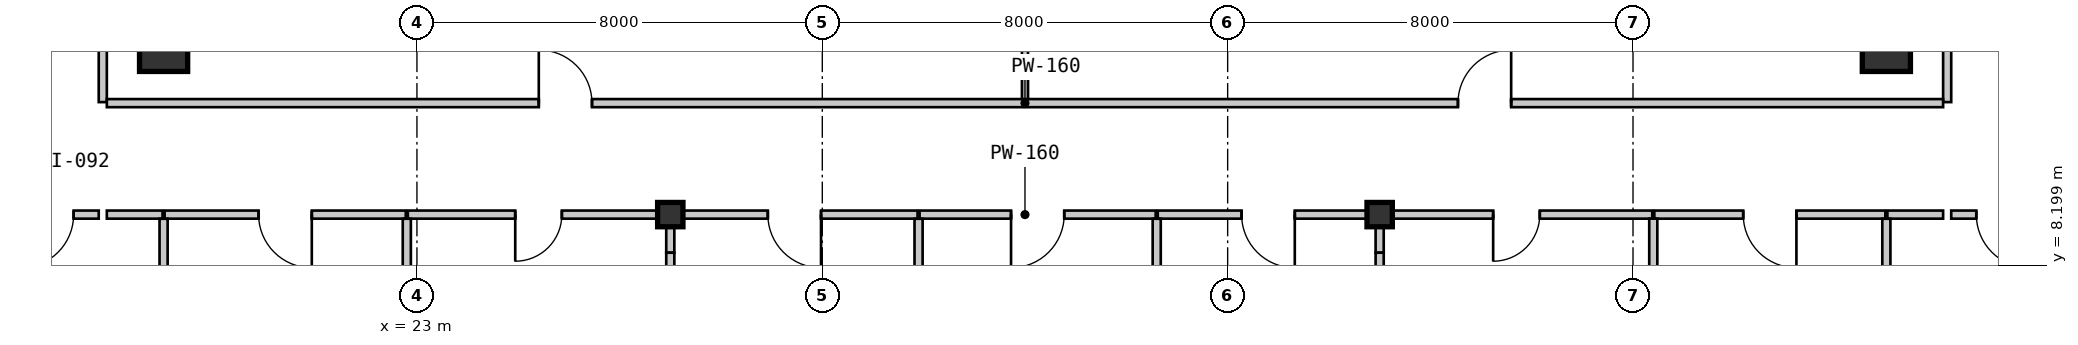
"""IFC4 building model, lengths in metres.
Left out: names, types, materials, properties, quantities, classifications, styles, units other than length and angle.
Written with IfcOpenShell. Run it as: python <this file> out.ifc"""

import sys

from ifc_helpers import new_model, si_unit, direction, frame, frame_2d, origin, origin_2d, place, context, subcontext, project, spatial, rectangle, i_section, extrude, source, transform, mapped, element, fill, save


model = new_model("IFC4")
c1 = context("Model", 3, precision=1e-05, world=origin(), true_north=direction((0.0, 1.0)))
c2 = subcontext(c1, "Body", "Model", "MODEL_VIEW")
j1 = project(units=[si_unit("LENGTHUNIT", "METRE"), si_unit("PLANEANGLEUNIT", "RADIAN")], contexts=[c1])
p1 = place(None, origin())
s1 = spatial("IfcSite", under=j1, at=p1, CompositionType="ELEMENT")
p2 = place(p1, origin())
s2 = spatial("IfcBuilding", under=s1, at=p2, CompositionType="ELEMENT")
p3 = place(p2, frame((0.0, 0.0, 19.95)))
s3 = spatial("IfcBuildingStorey", under=s2, at=p3, CompositionType="ELEMENT", Elevation=19.95)
m1 = source(origin(), c2, "Body", "SweptSolid", [
    extrude(i_section(OverallWidth=0.5, OverallDepth=0.48, WebThickness=0.028, FlangeThickness=0.044, at=origin_2d()), origin(), (0.0, 0.0, 1.0), 3.15),
])
for number, where, z_axis, x_axis in (
    (1, (28.0, 9.2, 0.0), (0.0, 0.0, 1.0), (1.0, 0.0, 0.0)),
    (2, (42.0, 9.2, 0.0), (0.0, 0.0, 1.0), (1.0, 0.0, 0.0)),
):
    element("IfcColumn", number, at=place(p3, frame(where, z_axis=z_axis, x_axis=x_axis)), inside=s3, PredefinedType="COLUMN", context=c2, shape_type="MappedRepresentation", body=[
        mapped(m1, transform((0.0, 0.0, 0.0), scale=1.0)),
    ])
m2 = source(origin(), c2, "Body", "SweptSolid", [
    extrude(rectangle(XDim=0.95, YDim=0.95, at=origin_2d()), origin(), (0.0, 0.0, 1.0), 3.15),
])
for number, where, z_axis, x_axis in (
    (3, (18.0, 12.5, 0.0), (0.0, 0.0, 1.0), (1.0, 0.0, 0.0)),
    (4, (52.0, 12.5, 0.0), (0.0, 0.0, 1.0), (1.0, 0.0, 0.0)),
):
    element("IfcColumn", number, at=place(p3, frame(where, z_axis=z_axis, x_axis=x_axis)), inside=s3, PredefinedType="COLUMN", context=c2, shape_type="MappedRepresentation", body=[
        mapped(m2, transform((0.0, 0.0, 0.0), scale=1.0)),
    ])
m3 = source(origin(), c2, "Body", "SweptSolid", [
    extrude(rectangle(XDim=5.16, YDim=0.16, at=frame_2d((2.58, 0.0))), origin(), (0.0, 0.0, 1.0), 2.93),
])
for number, where, z_axis, x_axis in (
    (5, (16.8, 16.58, 0.0), (0.0, 0.0, 1.0), (0.0, -1.0, 0.0)),
    (6, (53.2, 11.42, 0.0), (0.0, 0.0, 1.0), (0.0, 1.0, 0.0)),
):
    element("IfcWall", number, at=place(p3, frame(where, z_axis=z_axis, x_axis=x_axis)), inside=s3, PredefinedType="PARTITIONING", context=c2, shape_type="MappedRepresentation", body=[
        mapped(m3, transform((0.0, 0.0, 0.0), scale=1.0)),
    ])
m4 = source(origin(), c2, "Body", "SweptSolid", [
    extrude(rectangle(XDim=2.04, YDim=0.16, at=frame_2d((1.02, 0.0))), origin(), (0.0, 0.0, 1.0), 2.93),
])
p4 = place(p3, frame((16.72, 9.2, 0.0), z_axis=(0.0, 0.0, 1.0), x_axis=(-1.0, 0.0, 0.0)))
e7 = element("IfcWall", 7, at=p4, inside=s3, PredefinedType="PARTITIONING", context=c2, shape_type="MappedRepresentation", body=[
    mapped(m4, transform((0.0, 0.0, 0.0), scale=1.0)),
])
m5 = source(origin(), c2, "Body", "SweptSolid", [
    extrude(rectangle(XDim=1.05, YDim=2.1, at=frame_2d((0.525, 1.05))), frame((0.0, 0.09, 0.0), z_axis=(0.0, -1.0, 0.0), x_axis=(1.0, 0.0, 0.0)), (0.0, 0.0, 1.0), 0.18),
])
p5 = place(p4, frame((0.495, 0.0, 0.0)))
e8 = element("IfcOpeningElement", 8, at=p5, cuts=e7, PredefinedType="OPENING", context=c2, shape_type="MappedRepresentation", body=[
    mapped(m5, transform((0.0, 0.0, 0.0), scale=1.0)),
])
p6 = place(p3, frame((55.32, 9.2, 0.0), z_axis=(0.0, 0.0, 1.0), x_axis=(-1.0, 0.0, 0.0)))
e9 = element("IfcWall", 9, at=p6, inside=s3, PredefinedType="PARTITIONING", context=c2, shape_type="MappedRepresentation", body=[
    mapped(m4, transform((0.0, 0.0, 0.0), scale=1.0)),
])
p7 = place(p6, frame((0.495, 0.0, 0.0)))
e10 = element("IfcOpeningElement", 10, at=p7, cuts=e9, PredefinedType="OPENING", context=c2, shape_type="MappedRepresentation", body=[
    mapped(m5, transform((0.0, 0.0, 0.0), scale=1.0)),
])
m6 = source(origin(), c2, "Body", "SweptSolid", [
    extrude(rectangle(XDim=18.1, YDim=0.16, at=frame_2d((9.05, 0.0))), origin(), (0.0, 0.0, 1.0), 2.93),
])
p8 = place(p3, frame((16.88, 11.4, 0.0), z_axis=(0.0, 0.0, 1.0), x_axis=(1.0, 0.0, 0.0)))
e11 = element("IfcWall", 11, at=p8, inside=s3, PredefinedType="PARTITIONING", context=c2, shape_type="MappedRepresentation", body=[
    mapped(m6, transform((0.0, 0.0, 0.0), scale=1.0)),
])
p9 = place(p8, frame((8.525, 0.0, 0.0)))
e12 = element("IfcOpeningElement", 12, at=p9, cuts=e11, PredefinedType="OPENING", context=c2, shape_type="MappedRepresentation", body=[
    mapped(m5, transform((0.0, 0.0, 0.0), scale=1.0)),
])
p10 = place(p3, frame((35.02, 11.4, 0.0), z_axis=(0.0, 0.0, 1.0), x_axis=(1.0, 0.0, 0.0)))
e13 = element("IfcWall", 13, at=p10, inside=s3, PredefinedType="PARTITIONING", context=c2, shape_type="MappedRepresentation", body=[
    mapped(m6, transform((0.0, 0.0, 0.0), scale=1.0)),
])
p11 = place(p10, frame((8.525, 0.0, 0.0)))
e14 = element("IfcOpeningElement", 14, at=p11, cuts=e13, PredefinedType="OPENING", context=c2, shape_type="MappedRepresentation", body=[
    mapped(m5, transform((0.0, 0.0, 0.0), scale=1.0)),
])
m7 = source(origin(), c2, "Body", "SweptSolid", [
    extrude(rectangle(XDim=1.1, YDim=0.16, at=frame_2d((0.55, 0.0))), origin(), (0.0, 0.0, 1.0), 2.93),
])
p12 = place(p3, frame((17.98, 9.2, 0.0), z_axis=(0.0, 0.0, 1.0), x_axis=(-1.0, 0.0, 0.0)))
e15 = element("IfcWall", 15, at=p12, inside=s3, PredefinedType="PARTITIONING", context=c2, shape_type="MappedRepresentation", body=[
    mapped(m7, transform((0.0, 0.0, 0.0), scale=1.0)),
])
m8 = source(origin(), c2, "Body", "SweptSolid", [
    extrude(rectangle(XDim=4.76, YDim=0.16, at=frame_2d((2.38, 0.0))), origin(), (0.0, 0.0, 1.0), 2.93),
])
p13 = place(p3, frame((22.78, 9.2, 0.0), z_axis=(0.0, 0.0, 1.0), x_axis=(-1.0, 0.0, 0.0)))
e16 = element("IfcWall", 16, at=p13, inside=s3, PredefinedType="PARTITIONING", context=c2, shape_type="MappedRepresentation", body=[
    mapped(m8, transform((0.0, 0.0, 0.0), scale=1.0)),
])
p14 = place(p13, frame((1.855, 0.0, 0.0)))
e17 = element("IfcOpeningElement", 17, at=p14, cuts=e16, PredefinedType="OPENING", context=c2, shape_type="MappedRepresentation", body=[
    mapped(m5, transform((0.0, 0.0, 0.0), scale=1.0)),
])
m9 = source(origin(), c2, "Body", "SweptSolid", [
    extrude(rectangle(XDim=5.159, YDim=0.16, at=frame_2d((2.58, 0.0))), origin(), (0.0, 0.0, 1.0), 2.93),
])
p15 = place(p3, frame((27.98, 9.2, 0.0), z_axis=(0.0, 0.0, 1.0), x_axis=(-1.0, 0.0, 0.0)))
e18 = element("IfcWall", 18, at=p15, inside=s3, PredefinedType="PARTITIONING", context=c2, shape_type="MappedRepresentation", body=[
    mapped(m9, transform((0.0, 0.0, 0.0), scale=1.0)),
])
m10 = source(origin(), c2, "Body", "SweptSolid", [
    extrude(rectangle(XDim=0.92, YDim=2.1, at=frame_2d((0.46, 1.05))), frame((0.0, 0.09, 0.0), z_axis=(0.0, -1.0, 0.0), x_axis=(1.0, 0.0, 0.0)), (0.0, 0.0, 1.0), 0.18),
])
p16 = place(p15, frame((2.12, 0.0, 0.0)))
e19 = element("IfcOpeningElement", 19, at=p16, cuts=e18, PredefinedType="OPENING", context=c2, shape_type="MappedRepresentation", body=[
    mapped(m10, transform((0.0, 0.0, 0.0), scale=1.0)),
])
m11 = source(origin(), c2, "Body", "SweptSolid", [
    extrude(rectangle(XDim=4.859, YDim=0.16, at=frame_2d((2.43, 0.0))), origin(), (0.0, 0.0, 1.0), 2.328),
])
p17 = place(p3, frame((32.88, 9.2, 0.0), z_axis=(0.0, 0.0, 1.0), x_axis=(-1.0, 0.0, 0.0)))
e20 = element("IfcWall", 20, at=p17, inside=s3, PredefinedType="PARTITIONING", context=c2, shape_type="MappedRepresentation", body=[
    mapped(m11, transform((0.0, 0.0, 0.0), scale=1.0)),
])
p18 = place(p17, frame((1.905, 0.0, 0.0)))
e21 = element("IfcOpeningElement", 21, at=p18, cuts=e20, PredefinedType="OPENING", context=c2, shape_type="MappedRepresentation", body=[
    mapped(m5, transform((0.0, 0.0, 0.0), scale=1.0)),
])
m12 = source(origin(), c2, "Body", "SweptSolid", [
    extrude(rectangle(XDim=4.659, YDim=0.16, at=frame_2d((2.33, 0.0))), origin(), (0.0, 0.0, 1.0), 2.328),
])
p19 = place(p3, frame((37.58, 9.2, 0.0), z_axis=(0.0, 0.0, 1.0), x_axis=(-1.0, 0.0, 0.0)))
e22 = element("IfcWall", 22, at=p19, inside=s3, PredefinedType="PARTITIONING", context=c2, shape_type="MappedRepresentation", body=[
    mapped(m12, transform((0.0, 0.0, 0.0), scale=1.0)),
])
p20 = place(p19, frame((1.805, 0.0, 0.0)))
e23 = element("IfcOpeningElement", 23, at=p20, cuts=e22, PredefinedType="OPENING", context=c2, shape_type="MappedRepresentation", body=[
    mapped(m5, transform((0.0, 0.0, 0.0), scale=1.0)),
])
m13 = source(origin(), c2, "Body", "SweptSolid", [
    extrude(rectangle(XDim=4.359, YDim=0.16, at=frame_2d((2.18, 0.0))), origin(), (0.0, 0.0, 1.0), 2.328),
])
p21 = place(p3, frame((41.98, 9.2, 0.0), z_axis=(0.0, 0.0, 1.0), x_axis=(-1.0, 0.0, 0.0)))
e24 = element("IfcWall", 24, at=p21, inside=s3, PredefinedType="PARTITIONING", context=c2, shape_type="MappedRepresentation", body=[
    mapped(m13, transform((0.0, 0.0, 0.0), scale=1.0)),
])
p22 = place(p21, frame((1.655, 0.0, 0.0)))
e25 = element("IfcOpeningElement", 25, at=p22, cuts=e24, PredefinedType="OPENING", context=c2, shape_type="MappedRepresentation", body=[
    mapped(m5, transform((0.0, 0.0, 0.0), scale=1.0)),
])
m14 = source(origin(), c2, "Body", "SweptSolid", [
    extrude(rectangle(XDim=5.36, YDim=0.16, at=frame_2d((2.68, 0.0))), origin(), (0.0, 0.0, 1.0), 2.93),
])
p23 = place(p3, frame((47.38, 9.2, 0.0), z_axis=(0.0, 0.0, 1.0), x_axis=(-1.0, 0.0, 0.0)))
e26 = element("IfcWall", 26, at=p23, inside=s3, PredefinedType="PARTITIONING", context=c2, shape_type="MappedRepresentation", body=[
    mapped(m14, transform((0.0, 0.0, 0.0), scale=1.0)),
])
p24 = place(p23, frame((2.22, 0.0, 0.0)))
e27 = element("IfcOpeningElement", 27, at=p24, cuts=e26, PredefinedType="OPENING", context=c2, shape_type="MappedRepresentation", body=[
    mapped(m10, transform((0.0, 0.0, 0.0), scale=1.0)),
])
m15 = source(origin(), c2, "Body", "SweptSolid", [
    extrude(rectangle(XDim=4.559, YDim=0.16, at=frame_2d((2.28, 0.0))), origin(), (0.0, 0.0, 1.0), 2.93),
])
p25 = place(p3, frame((51.98, 9.2, 0.0), z_axis=(0.0, 0.0, 1.0), x_axis=(-1.0, 0.0, 0.0)))
e28 = element("IfcWall", 28, at=p25, inside=s3, PredefinedType="PARTITIONING", context=c2, shape_type="MappedRepresentation", body=[
    mapped(m15, transform((0.0, 0.0, 0.0), scale=1.0)),
])
p26 = place(p25, frame((1.755, 0.0, 0.0)))
e29 = element("IfcOpeningElement", 29, at=p26, cuts=e28, PredefinedType="OPENING", context=c2, shape_type="MappedRepresentation", body=[
    mapped(m5, transform((0.0, 0.0, 0.0), scale=1.0)),
])
p27 = place(p3, frame((53.12, 9.2, 0.0), z_axis=(0.0, 0.0, 1.0), x_axis=(-1.0, 0.0, 0.0)))
e30 = element("IfcWall", 30, at=p27, inside=s3, PredefinedType="PARTITIONING", context=c2, shape_type="MappedRepresentation", body=[
    mapped(m7, transform((0.0, 0.0, 0.0), scale=1.0)),
])
m16 = source(origin(), c2, "Body", "SweptSolid", [
    extrude(rectangle(XDim=5.04, YDim=0.12, at=frame_2d((2.52, 0.0))), origin(), (0.0, 0.0, 1.0), 2.93),
])
p28 = place(p3, frame((35.0, 16.52, 0.0), z_axis=(0.0, 0.0, 1.0), x_axis=(0.0, -1.0, 0.0)))
e31 = element("IfcWall", 31, at=p28, inside=s3, PredefinedType="PARTITIONING", context=c2, shape_type="MappedRepresentation", body=[
    mapped(m16, transform((0.0, 0.0, 0.0), scale=1.0)),
])
m17 = source(origin(), c2, "Body", "SweptSolid", [
    extrude(rectangle(XDim=2.448, YDim=0.16, at=frame_2d((1.224, 0.0))), origin(), (0.0, 0.0, 1.0), 2.93),
])
p29 = place(p3, frame((18.0, 9.118, 0.0), z_axis=(0.0, 0.0, 1.0), x_axis=(0.0, -1.0, 0.0)))
e32 = element("IfcWall", 32, at=p29, inside=s3, PredefinedType="PARTITIONING", context=c2, shape_type="MappedRepresentation", body=[
    mapped(m17, transform((0.0, 0.0, 0.0), scale=1.0)),
])
m18 = source(origin(), c2, "Body", "SweptSolid", [
    extrude(rectangle(XDim=7.386, YDim=0.16, at=frame_2d((3.693, 0.0))), origin(), (0.0, 0.0, 1.0), 2.93),
])
p30 = place(p3, frame((22.8, 9.118, 0.0), z_axis=(0.0, 0.0, 1.0), x_axis=(0.0, -1.0, 0.0)))
e33 = element("IfcWall", 33, at=p30, inside=s3, PredefinedType="PARTITIONING", context=c2, shape_type="MappedRepresentation", body=[
    mapped(m18, transform((0.0, 0.0, 0.0), scale=1.0)),
])
m19 = source(origin(), c2, "Body", "SweptSolid", [
    extrude(rectangle(XDim=0.672, YDim=0.16, at=frame_2d((0.336, 0.0))), origin(), (0.0, 0.0, 1.0), 2.397),
])
p31 = place(p3, frame((28.0, 9.12, 0.0), z_axis=(0.0, 0.0, 1.0), x_axis=(0.0, -1.0, 0.0)))
e34 = element("IfcWall", 34, at=p31, inside=s3, PredefinedType="PARTITIONING", context=c2, shape_type="MappedRepresentation", body=[
    mapped(m19, transform((0.0, 0.0, 0.0), scale=1.0)),
])
m20 = source(origin(), c2, "Body", "SweptSolid", [
    extrude(rectangle(XDim=1.778, YDim=0.16, at=frame_2d((0.889, 0.0))), origin(), (0.0, 0.0, 1.0), 2.93),
])
p32 = place(p3, frame((28.0, 8.448, 0.0), z_axis=(0.0, 0.0, 1.0), x_axis=(0.0, -1.0, 0.0)))
e35 = element("IfcWall", 35, at=p32, inside=s3, PredefinedType="PARTITIONING", context=c2, shape_type="MappedRepresentation", body=[
    mapped(m20, transform((0.0, 0.0, 0.0), scale=1.0)),
])
for number, where, z_axis, x_axis in (
    (36, (32.9, 9.118, 0.0), (0.0, 0.0, 1.0), (0.0, -1.0, 0.0)),
    (37, (37.6, 9.118, 0.0), (0.0, 0.0, 1.0), (0.0, -1.0, 0.0)),
):
    element("IfcWall", number, at=place(p3, frame(where, z_axis=z_axis, x_axis=x_axis)), inside=s3, PredefinedType="PARTITIONING", context=c2, shape_type="MappedRepresentation", body=[
        mapped(m17, transform((0.0, 0.0, 0.0), scale=1.0)),
    ])
m21 = source(origin(), c2, "Body", "SweptSolid", [
    extrude(rectangle(XDim=0.67, YDim=0.16, at=frame_2d((0.335, 0.0))), origin(), (0.0, 0.0, 1.0), 2.397),
])
p33 = place(p3, frame((42.0, 9.118, 0.0), z_axis=(0.0, 0.0, 1.0), x_axis=(0.0, -1.0, 0.0)))
e38 = element("IfcWall", 38, at=p33, inside=s3, PredefinedType="PARTITIONING", context=c2, shape_type="MappedRepresentation", body=[
    mapped(m21, transform((0.0, 0.0, 0.0), scale=1.0)),
])
m22 = source(origin(), c2, "Body", "SweptSolid", [
    extrude(rectangle(XDim=6.716, YDim=0.16, at=frame_2d((3.358, 0.0))), origin(), (0.0, 0.0, 1.0), 2.93),
])
p34 = place(p3, frame((42.0, 8.448, 0.0), z_axis=(0.0, 0.0, 1.0), x_axis=(0.0, -1.0, 0.0)))
e39 = element("IfcWall", 39, at=p34, inside=s3, PredefinedType="PARTITIONING", context=c2, shape_type="MappedRepresentation", body=[
    mapped(m22, transform((0.0, 0.0, 0.0), scale=1.0)),
])
m23 = source(origin(), c2, "Body", "SweptSolid", [
    extrude(rectangle(XDim=2.45, YDim=0.16, at=frame_2d((1.225, 0.0))), origin(), (0.0, 0.0, 1.0), 2.93),
])
p35 = place(p3, frame((47.4, 9.12, 0.0), z_axis=(0.0, 0.0, 1.0), x_axis=(0.0, -1.0, 0.0)))
e40 = element("IfcWall", 40, at=p35, inside=s3, PredefinedType="PARTITIONING", context=c2, shape_type="MappedRepresentation", body=[
    mapped(m23, transform((0.0, 0.0, 0.0), scale=1.0)),
])
p36 = place(p3, frame((52.0, 9.118, 0.0), z_axis=(0.0, 0.0, 1.0), x_axis=(0.0, -1.0, 0.0)))
e41 = element("IfcWall", 41, at=p36, inside=s3, PredefinedType="PARTITIONING", context=c2, shape_type="MappedRepresentation", body=[
    mapped(m17, transform((0.0, 0.0, 0.0), scale=1.0)),
])
m24 = source(origin(), c2, "Body", "SweptSolid", [
    extrude(rectangle(XDim=1.05, YDim=2.1, at=frame_2d((0.525, 1.05))), frame((0.0, 0.025, 0.0), z_axis=(0.0, -1.0, 0.0), x_axis=(1.0, 0.0, 0.0)), (0.0, 0.0, 1.0), 0.05),
])
p37 = place(p5, origin())
e42 = element("IfcDoor", 42, at=p37, inside=s3, OperationType="SINGLE_SWING_RIGHT", PredefinedType="DOOR", context=c2, shape_type="MappedRepresentation", body=[
    mapped(m24, transform((0.0, 0.0, 0.0), scale=1.0)),
])
fill(e8, e42)
p38 = place(p7, origin())
e43 = element("IfcDoor", 43, at=p38, inside=s3, OperationType="SINGLE_SWING_LEFT", PredefinedType="DOOR", context=c2, shape_type="MappedRepresentation", body=[
    mapped(m24, transform((0.0, 0.0, 0.0), scale=1.0)),
])
fill(e10, e43)
p39 = place(p9, origin())
e44 = element("IfcDoor", 44, at=p39, inside=s3, OperationType="SINGLE_SWING_LEFT", PredefinedType="DOOR", context=c2, shape_type="MappedRepresentation", body=[
    mapped(m24, transform((0.0, 0.0, 0.0), scale=1.0)),
])
fill(e12, e44)
p40 = place(p11, origin())
e45 = element("IfcDoor", 45, at=p40, inside=s3, OperationType="SINGLE_SWING_RIGHT", PredefinedType="DOOR", context=c2, shape_type="MappedRepresentation", body=[
    mapped(m24, transform((0.0, 0.0, 0.0), scale=1.0)),
])
fill(e14, e45)
p41 = place(p14, origin())
e46 = element("IfcDoor", 46, at=p41, inside=s3, OperationType="SINGLE_SWING_LEFT", PredefinedType="DOOR", context=c2, shape_type="MappedRepresentation", body=[
    mapped(m24, transform((0.0, 0.0, 0.0), scale=1.0)),
])
fill(e17, e46)
m25 = source(origin(), c2, "Body", "SweptSolid", [
    extrude(rectangle(XDim=0.92, YDim=2.1, at=frame_2d((0.46, 1.05))), frame((0.0, 0.025, 0.0), z_axis=(0.0, -1.0, 0.0), x_axis=(1.0, 0.0, 0.0)), (0.0, 0.0, 1.0), 0.05),
])
p42 = place(p16, origin())
e47 = element("IfcDoor", 47, at=p42, inside=s3, OperationType="SINGLE_SWING_RIGHT", PredefinedType="DOOR", context=c2, shape_type="MappedRepresentation", body=[
    mapped(m25, transform((0.0, 0.0, 0.0), scale=1.0)),
])
fill(e19, e47)
p43 = place(p18, origin())
e48 = element("IfcDoor", 48, at=p43, inside=s3, OperationType="SINGLE_SWING_LEFT", PredefinedType="DOOR", context=c2, shape_type="MappedRepresentation", body=[
    mapped(m24, transform((0.0, 0.0, 0.0), scale=1.0)),
])
fill(e21, e48)
p44 = place(p20, origin())
e49 = element("IfcDoor", 49, at=p44, inside=s3, OperationType="SINGLE_SWING_RIGHT", PredefinedType="DOOR", context=c2, shape_type="MappedRepresentation", body=[
    mapped(m24, transform((0.0, 0.0, 0.0), scale=1.0)),
])
fill(e23, e49)
p45 = place(p22, origin())
e50 = element("IfcDoor", 50, at=p45, inside=s3, OperationType="SINGLE_SWING_LEFT", PredefinedType="DOOR", context=c2, shape_type="MappedRepresentation", body=[
    mapped(m24, transform((0.0, 0.0, 0.0), scale=1.0)),
])
fill(e25, e50)
p46 = place(p24, origin())
e51 = element("IfcDoor", 51, at=p46, inside=s3, OperationType="SINGLE_SWING_RIGHT", PredefinedType="DOOR", context=c2, shape_type="MappedRepresentation", body=[
    mapped(m25, transform((0.0, 0.0, 0.0), scale=1.0)),
])
fill(e27, e51)
p47 = place(p26, origin())
e52 = element("IfcDoor", 52, at=p47, inside=s3, OperationType="SINGLE_SWING_LEFT", PredefinedType="DOOR", context=c2, shape_type="MappedRepresentation", body=[
    mapped(m24, transform((0.0, 0.0, 0.0), scale=1.0)),
])
fill(e29, e52)
save(model, sys.argv[1])
